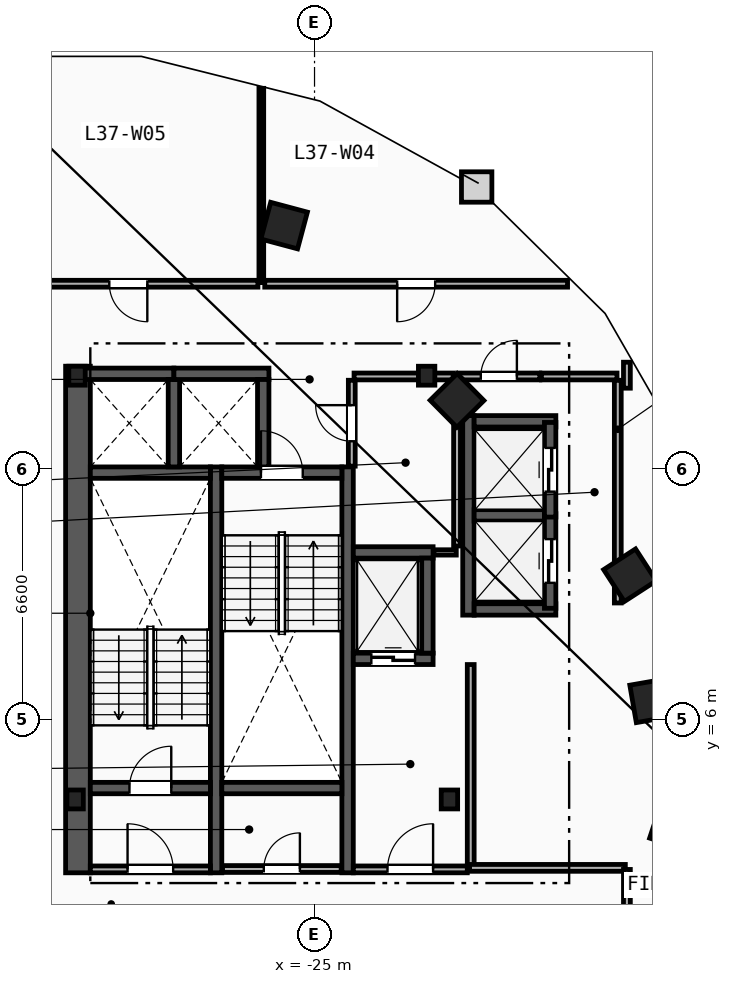
"""IFC4 building model, lengths in metres.
Left out: names, types, materials, properties, quantities, classifications, styles, units other than length and angle.
Written with IfcOpenShell. Run it as: python <this file> out.ifc"""

import sys

from ifc_helpers import new_model, si_unit, direction, frame, frame_2d, origin, origin_2d, place, context, subcontext, project, spatial, rectangle, i_section, extrude, element, fill, save


model = new_model("IFC4")
c1 = context("Model", 3, precision=1e-05, world=origin(), true_north=direction((0.0, 1.0)))
c2 = subcontext(c1, "Body", "Model", "MODEL_VIEW")
j1 = project(units=[si_unit("LENGTHUNIT", "METRE"), si_unit("PLANEANGLEUNIT", "RADIAN")], contexts=[c1])
p1 = place(None, origin())
s1 = spatial("IfcSite", under=j1, at=p1, CompositionType="ELEMENT")
p2 = place(p1, origin())
s2 = spatial("IfcBuilding", under=s1, at=p2, CompositionType="ELEMENT")
p3 = place(p2, frame((0.0, 0.0, 144.0)))
s3 = spatial("IfcBuildingStorey", under=s2, at=p3, CompositionType="ELEMENT", Elevation=144.0)
for number, where, z_axis, x_axis in (
    (1, (-31.3, 3.9, 0.0), (0.0, 0.0, 1.0), (1.0, 0.0, 0.0)),
    (2, (-21.45, 3.9, 0.0), (0.0, 0.0, 1.0), (1.0, 0.0, 0.0)),
    (3, (-22.05, 15.05, 0.0), (0.0, 0.0, 1.0), (1.0, 0.0, 0.0)),
    (4, (-31.25, 15.05, 0.0), (0.0, 0.0, 1.0), (1.0, 0.0, 0.0)),
):
    element("IfcColumn", number, at=place(p3, frame(where, z_axis=z_axis, x_axis=x_axis)), inside=s3, PredefinedType="COLUMN", context=c2, shape_type="SweptSolid", body=[
        extrude(i_section(OverallWidth=0.432, OverallDepth=0.498, WebThickness=0.056, FlangeThickness=0.089, FilletRadius=0.018, at=origin_2d()), origin(), (0.0, 0.0, 1.0), 3.6),
    ])
for number, where, z_axis, x_axis in (
    (5, (-15.55, 3.2, 0.0), (0.0, 0.0, 1.0), (0.315, 0.949, 0.0)),
    (6, (-16.125, 6.5, 0.0), (0.0, 0.0, 1.0), (-0.172, 0.985, 0.0)),
    (7, (-16.7, 9.8, 0.0), (0.0, 0.0, 1.0), (-0.544, 0.839, 0.0)),
    (8, (-21.25, 14.4, 0.0), (0.0, 0.0, 1.0), (-0.703, 0.711, 0.0)),
    (9, (-25.8, 19.0, 0.0), (0.0, 0.0, 1.0), (-0.966, 0.259, 0.0)),
):
    element("IfcColumn", number, at=place(p3, frame(where, z_axis=z_axis, x_axis=x_axis)), inside=s3, PredefinedType="COLUMN", context=c2, shape_type="SweptSolid", body=[
        extrude(rectangle(XDim=1.0, YDim=1.0, at=origin_2d()), origin(), (0.0, 0.0, 1.0), 3.6),
    ])
p4 = place(p3, frame((-31.225, 1.97, 0.0), z_axis=(0.0, 0.0, 1.0), x_axis=(0.0, 1.0, 0.0)))
e10 = element("IfcWall", 10, at=p4, inside=s3, PredefinedType="SHEAR", context=c2, shape_type="SweptSolid", body=[
    extrude(rectangle(XDim=13.33, YDim=0.65, at=frame_2d((6.665, 0.0))), origin(), (0.0, 0.0, 1.0), 3.36),
])
for number, where, z_axis, x_axis in (
    (11, (-27.59, 1.97, 0.0), (0.0, 0.0, 1.0), (0.0, 1.0, 0.0)),
    (12, (-24.13, 1.97, 0.0), (0.0, 0.0, 1.0), (0.0, 1.0, 0.0)),
):
    element("IfcWall", number, at=place(p3, frame(where, z_axis=z_axis, x_axis=x_axis)), inside=s3, PredefinedType="SHEAR", context=c2, shape_type="SweptSolid", body=[
        extrude(rectangle(XDim=10.68, YDim=0.3, at=frame_2d((5.34, 0.0))), origin(), (0.0, 0.0, 1.0), 3.36),
    ])
p5 = place(p3, frame((-30.9, 4.2, 0.0), z_axis=(0.0, 0.0, 1.0), x_axis=(1.0, 0.0, 0.0)))
e13 = element("IfcWall", 13, at=p5, inside=s3, PredefinedType="SHEAR", context=c2, shape_type="SweptSolid", body=[
    extrude(rectangle(XDim=3.16, YDim=0.3, at=frame_2d((1.58, 0.0))), origin(), (0.0, 0.0, 1.0), 3.36),
])
p6 = place(p5, frame((1.03, 0.0, 0.0)))
e14 = element("IfcOpeningElement", 14, at=p6, cuts=e13, PredefinedType="OPENING", context=c2, shape_type="SweptSolid", body=[
    extrude(rectangle(XDim=1.1, YDim=2.15, at=frame_2d((0.55, 1.075))), frame((0.0, 0.16, 0.0), z_axis=(0.0, -1.0, 0.0), x_axis=(1.0, 0.0, 0.0)), (0.0, 0.0, 1.0), 0.32),
])
p7 = place(p3, frame((-30.9, 12.5, 0.0), z_axis=(0.0, 0.0, 1.0), x_axis=(1.0, 0.0, 0.0)))
e15 = element("IfcWall", 15, at=p7, inside=s3, PredefinedType="SHEAR", context=c2, shape_type="SweptSolid", body=[
    extrude(rectangle(XDim=3.16, YDim=0.3, at=frame_2d((1.58, 0.0))), origin(), (0.0, 0.0, 1.0), 3.36),
])
p8 = place(p3, frame((-27.44, 12.5, 0.0), z_axis=(0.0, 0.0, 1.0), x_axis=(1.0, 0.0, 0.0)))
e16 = element("IfcWall", 16, at=p8, inside=s3, PredefinedType="SHEAR", context=c2, shape_type="SweptSolid", body=[
    extrude(rectangle(XDim=3.16, YDim=0.3, at=frame_2d((1.58, 0.0))), origin(), (0.0, 0.0, 1.0), 3.36),
])
p9 = place(p8, frame((1.03, 0.0, 0.0)))
e17 = element("IfcOpeningElement", 17, at=p9, cuts=e16, PredefinedType="OPENING", context=c2, shape_type="SweptSolid", body=[
    extrude(rectangle(XDim=1.1, YDim=2.15, at=frame_2d((0.55, 1.075))), frame((0.0, 0.16, 0.0), z_axis=(0.0, -1.0, 0.0), x_axis=(1.0, 0.0, 0.0)), (0.0, 0.0, 1.0), 0.32),
])
p10 = place(p3, frame((-27.44, 4.2, 0.0), z_axis=(0.0, 0.0, 1.0), x_axis=(1.0, 0.0, 0.0)))
e18 = element("IfcWall", 18, at=p10, inside=s3, PredefinedType="SHEAR", context=c2, shape_type="SweptSolid", body=[
    extrude(rectangle(XDim=3.16, YDim=0.3, at=frame_2d((1.58, 0.0))), origin(), (0.0, 0.0, 1.0), 3.36),
])
p11 = place(p3, frame((-20.89, 2.15, 0.0), z_axis=(0.0, 0.0, 1.0), x_axis=(0.0, 1.0, 0.0)))
e19 = element("IfcWall", 19, at=p11, inside=s3, PredefinedType="PARTITIONING", context=c2, shape_type="SweptSolid", body=[
    extrude(rectangle(XDim=5.3, YDim=0.18, at=frame_2d((2.65, 0.0))), origin(), (0.0, 0.0, 1.0), 3.36),
])
p12 = place(p3, frame((-23.98, 2.06, 0.0), z_axis=(0.0, 0.0, 1.0), x_axis=(1.0, 0.0, 0.0)))
e20 = element("IfcWall", 20, at=p12, inside=s3, PredefinedType="PARTITIONING", context=c2, shape_type="SweptSolid", body=[
    extrude(rectangle(XDim=3.0, YDim=0.18, at=frame_2d((1.5, 0.0))), origin(), (0.0, 0.0, 1.0), 3.36),
])
p13 = place(p12, frame((0.9, 0.0, 0.0)))
e21 = element("IfcOpeningElement", 21, at=p13, cuts=e20, PredefinedType="OPENING", context=c2, shape_type="SweptSolid", body=[
    extrude(rectangle(XDim=1.2, YDim=2.15, at=frame_2d((0.6, 1.075))), frame((0.0, 0.1, 0.0), z_axis=(0.0, -1.0, 0.0), x_axis=(1.0, 0.0, 0.0)), (0.0, 0.0, 1.0), 0.2),
])
p14 = place(p3, frame((-30.9, 2.06, 0.0), z_axis=(0.0, 0.0, 1.0), x_axis=(1.0, 0.0, 0.0)))
e22 = element("IfcWall", 22, at=p14, inside=s3, PredefinedType="PARTITIONING", context=c2, shape_type="SweptSolid", body=[
    extrude(rectangle(XDim=3.16, YDim=0.18, at=frame_2d((1.58, 0.0))), origin(), (0.0, 0.0, 1.0), 3.36),
])
p15 = place(p14, frame((0.98, 0.0, 0.0)))
e23 = element("IfcOpeningElement", 23, at=p15, cuts=e22, PredefinedType="OPENING", context=c2, shape_type="SweptSolid", body=[
    extrude(rectangle(XDim=1.2, YDim=2.15, at=frame_2d((0.6, 1.075))), frame((0.0, 0.1, 0.0), z_axis=(0.0, -1.0, 0.0), x_axis=(1.0, 0.0, 0.0)), (0.0, 0.0, 1.0), 0.2),
])
p16 = place(p3, frame((-23.98, 7.6, 0.0), z_axis=(0.0, 0.0, 1.0), x_axis=(1.0, 0.0, 0.0)))
e24 = element("IfcWall", 24, at=p16, inside=s3, PredefinedType="SHEAR", context=c2, shape_type="SweptSolid", body=[
    extrude(rectangle(XDim=2.1, YDim=0.3, at=frame_2d((1.05, 0.0))), origin(), (0.0, 0.0, 1.0), 3.36),
])
p17 = place(p16, frame((0.475, 0.0, 0.0)))
e25 = element("IfcOpeningElement", 25, at=p17, cuts=e24, PredefinedType="OPENING", context=c2, shape_type="SweptSolid", body=[
    extrude(rectangle(XDim=1.15, YDim=2.2, at=frame_2d((0.575, 1.1))), frame((0.0, 0.16, 0.0), z_axis=(0.0, -1.0, 0.0), x_axis=(1.0, 0.0, 0.0)), (0.0, 0.0, 1.0), 0.32),
])
p18 = place(p3, frame((-23.98, 10.4, 0.0), z_axis=(0.0, 0.0, 1.0), x_axis=(1.0, 0.0, 0.0)))
e26 = element("IfcWall", 26, at=p18, inside=s3, PredefinedType="SHEAR", context=c2, shape_type="SweptSolid", body=[
    extrude(rectangle(XDim=2.1, YDim=0.3, at=frame_2d((1.05, 0.0))), origin(), (0.0, 0.0, 1.0), 3.36),
])
for number, where, z_axis, x_axis in (
    (27, (-22.03, 7.75, 0.0), (0.0, 0.0, 1.0), (0.0, 1.0, 0.0)),
    (28, (-31.2, 15.1, 0.0), (0.0, 0.0, 1.0), (1.0, 0.0, 0.0)),
):
    element("IfcWall", number, at=place(p3, frame(where, z_axis=z_axis, x_axis=x_axis)), inside=s3, PredefinedType="SHEAR", context=c2, shape_type="SweptSolid", body=[
        extrude(rectangle(XDim=2.5, YDim=0.3, at=frame_2d((1.25, 0.0))), origin(), (0.0, 0.0, 1.0), 3.36),
    ])
p19 = place(p3, frame((-28.7, 12.65, 0.0), z_axis=(0.0, 0.0, 1.0), x_axis=(0.0, 1.0, 0.0)))
e29 = element("IfcWall", 29, at=p19, inside=s3, PredefinedType="SHEAR", context=c2, shape_type="SweptSolid", body=[
    extrude(rectangle(XDim=2.3, YDim=0.3, at=frame_2d((1.15, 0.0))), origin(), (0.0, 0.0, 1.0), 3.36),
])
p20 = place(p3, frame((-28.7, 15.1, 0.0), z_axis=(0.0, 0.0, 1.0), x_axis=(1.0, 0.0, 0.0)))
e30 = element("IfcWall", 30, at=p20, inside=s3, PredefinedType="SHEAR", context=c2, shape_type="SweptSolid", body=[
    extrude(rectangle(XDim=2.5, YDim=0.3, at=frame_2d((1.25, 0.0))), origin(), (0.0, 0.0, 1.0), 3.36),
])
p21 = place(p3, frame((-26.35, 12.65, 0.0), z_axis=(0.0, 0.0, 1.0), x_axis=(0.0, 1.0, 0.0)))
e31 = element("IfcWall", 31, at=p21, inside=s3, PredefinedType="SHEAR", context=c2, shape_type="SweptSolid", body=[
    extrude(rectangle(XDim=2.3, YDim=0.3, at=frame_2d((1.15, 0.0))), origin(), (0.0, 0.0, 1.0), 3.36),
])
p22 = place(p3, frame((-20.95, 8.75, 0.0), z_axis=(0.0, 0.0, 1.0), x_axis=(0.0, 1.0, 0.0)))
e32 = element("IfcWall", 32, at=p22, inside=s3, PredefinedType="SHEAR", context=c2, shape_type="SweptSolid", body=[
    extrude(rectangle(XDim=5.25, YDim=0.3, at=frame_2d((2.625, 0.0))), origin(), (0.0, 0.0, 1.0), 3.36),
])
for number, where, z_axis, x_axis in (
    (33, (-20.8, 8.9, 0.0), (0.0, 0.0, 1.0), (1.0, 0.0, 0.0)),
    (34, (-20.8, 13.85, 0.0), (0.0, 0.0, 1.0), (1.0, 0.0, 0.0)),
):
    element("IfcWall", number, at=place(p3, frame(where, z_axis=z_axis, x_axis=x_axis)), inside=s3, PredefinedType="SHEAR", context=c2, shape_type="SweptSolid", body=[
        extrude(rectangle(XDim=2.15, YDim=0.3, at=frame_2d((1.075, 0.0))), origin(), (0.0, 0.0, 1.0), 3.36),
    ])
p23 = place(p3, frame((-20.8, 11.375, 0.0), z_axis=(0.0, 0.0, 1.0), x_axis=(1.0, 0.0, 0.0)))
e35 = element("IfcWall", 35, at=p23, inside=s3, PredefinedType="SHEAR", context=c2, shape_type="SweptSolid", body=[
    extrude(rectangle(XDim=1.85, YDim=0.3, at=frame_2d((0.925, 0.0))), origin(), (0.0, 0.0, 1.0), 3.36),
])
p24 = place(p3, frame((-18.8, 8.93, 0.0), z_axis=(0.0, 0.0, 1.0), x_axis=(0.0, 1.0, 0.0)))
e36 = element("IfcWall", 36, at=p24, inside=s3, PredefinedType="SHEAR", context=c2, shape_type="SweptSolid", body=[
    extrude(rectangle(XDim=2.49, YDim=0.3, at=frame_2d((1.245, 0.0))), origin(), (0.0, 0.0, 1.0), 3.36),
])
p25 = place(p24, frame((0.67, 0.0, 0.0)))
e37 = element("IfcOpeningElement", 37, at=p25, cuts=e36, PredefinedType="OPENING", context=c2, shape_type="SweptSolid", body=[
    extrude(rectangle(XDim=1.15, YDim=2.2, at=frame_2d((0.575, 1.1))), frame((0.0, 0.16, 0.0), z_axis=(0.0, -1.0, 0.0), x_axis=(1.0, 0.0, 0.0)), (0.0, 0.0, 1.0), 0.32),
])
p26 = place(p3, frame((-18.8, 11.33, 0.0), z_axis=(0.0, 0.0, 1.0), x_axis=(0.0, 1.0, 0.0)))
e38 = element("IfcWall", 38, at=p26, inside=s3, PredefinedType="SHEAR", context=c2, shape_type="SweptSolid", body=[
    extrude(rectangle(XDim=2.49, YDim=0.3, at=frame_2d((1.245, 0.0))), origin(), (0.0, 0.0, 1.0), 3.36),
])
p27 = place(p26, frame((0.67, 0.0, 0.0)))
e39 = element("IfcOpeningElement", 39, at=p27, cuts=e38, PredefinedType="OPENING", context=c2, shape_type="SweptSolid", body=[
    extrude(rectangle(XDim=1.15, YDim=2.2, at=frame_2d((0.575, 1.1))), frame((0.0, 0.16, 0.0), z_axis=(0.0, -1.0, 0.0), x_axis=(1.0, 0.0, 0.0)), (0.0, 0.0, 1.0), 0.32),
])
p28 = place(p3, frame((-17.02, 9.07, 0.0), z_axis=(0.0, 0.0, 1.0), x_axis=(0.0, 1.0, 0.0)))
e40 = element("IfcWall", 40, at=p28, inside=s3, PredefinedType="PARTITIONING", context=c2, shape_type="SweptSolid", body=[
    extrude(rectangle(XDim=5.86, YDim=0.18, at=frame_2d((2.93, 0.0))), origin(), (0.0, 0.0, 1.0), 3.36),
])
p29 = place(p3, frame((-21.23, 15.03, 0.0), z_axis=(0.0, 0.0, 1.0), x_axis=(1.0, 0.0, 0.0)))
e41 = element("IfcWall", 41, at=p29, inside=s3, PredefinedType="PARTITIONING", context=c2, shape_type="SweptSolid", body=[
    extrude(rectangle(XDim=2.16, YDim=0.18, at=frame_2d((1.08, 0.0))), origin(), (0.0, 0.0, 1.0), 3.36),
])
p30 = place(p29, frame((0.605, 0.0, 0.0)))
e42 = element("IfcOpeningElement", 42, at=p30, cuts=e41, PredefinedType="OPENING", context=c2, shape_type="SweptSolid", body=[
    extrude(rectangle(XDim=0.95, YDim=2.1, at=frame_2d((0.475, 1.05))), frame((0.0, 0.1, 0.0), z_axis=(0.0, -1.0, 0.0), x_axis=(1.0, 0.0, 0.0)), (0.0, 0.0, 1.0), 0.2),
])
p31 = place(p3, frame((-19.03, 15.03, 0.0), z_axis=(0.0, 0.0, 1.0), x_axis=(1.0, 0.0, 0.0)))
e43 = element("IfcWall", 43, at=p31, inside=s3, PredefinedType="PARTITIONING", context=c2, shape_type="SweptSolid", body=[
    extrude(rectangle(XDim=1.99, YDim=0.18, at=frame_2d((0.995, 0.0))), origin(), (0.0, 0.0, 1.0), 3.36),
])
p32 = place(p3, frame((-21.86, 10.4, 0.0), z_axis=(0.0, 0.0, 1.0), x_axis=(1.0, 0.0, 0.0)))
e44 = element("IfcWall", 44, at=p32, inside=s3, PredefinedType="PARTITIONING", context=c2, shape_type="SweptSolid", body=[
    extrude(rectangle(XDim=0.59, YDim=0.14, at=frame_2d((0.295, 0.0))), origin(), (0.0, 0.0, 1.0), 3.36),
])
p33 = place(p3, frame((-21.25, 10.57, 0.0), z_axis=(0.0, 0.0, 1.0), x_axis=(0.0, 1.0, 0.0)))
e45 = element("IfcWall", 45, at=p33, inside=s3, PredefinedType="PARTITIONING", context=c2, shape_type="SweptSolid", body=[
    extrude(rectangle(XDim=4.36, YDim=0.18, at=frame_2d((2.18, 0.0))), origin(), (0.0, 0.0, 1.0), 3.36),
])
p34 = place(p3, frame((-23.96, 15.03, 0.0), z_axis=(0.0, 0.0, 1.0), x_axis=(1.0, 0.0, 0.0)))
e46 = element("IfcWall", 46, at=p34, inside=s3, PredefinedType="PARTITIONING", context=c2, shape_type="SweptSolid", body=[
    extrude(rectangle(XDim=2.61, YDim=0.18, at=frame_2d((1.305, 0.0))), origin(), (0.0, 0.0, 1.0), 2.433),
])
p35 = place(p3, frame((-27.42, 2.07, 0.0), z_axis=(0.0, 0.0, 1.0), x_axis=(1.0, 0.0, 0.0)))
e47 = element("IfcWall", 47, at=p35, inside=s3, PredefinedType="PARTITIONING", context=c2, shape_type="SweptSolid", body=[
    extrude(rectangle(XDim=3.12, YDim=0.18, at=frame_2d((1.56, 0.0))), origin(), (0.0, 0.0, 1.0), 3.36),
])
p36 = place(p35, frame((1.085, 0.0, 0.0)))
e48 = element("IfcOpeningElement", 48, at=p36, cuts=e47, PredefinedType="OPENING", context=c2, shape_type="SweptSolid", body=[
    extrude(rectangle(XDim=0.95, YDim=2.1, at=frame_2d((0.475, 1.05))), frame((0.0, 0.1, 0.0), z_axis=(0.0, -1.0, 0.0), x_axis=(1.0, 0.0, 0.0)), (0.0, 0.0, 1.0), 0.2),
])
p37 = place(p3, frame((-24.02, 12.67, 0.0), z_axis=(0.0, 0.0, 1.0), x_axis=(0.0, 1.0, 0.0)))
e49 = element("IfcWall", 49, at=p37, inside=s3, PredefinedType="PARTITIONING", context=c2, shape_type="SweptSolid", body=[
    extrude(rectangle(XDim=2.26, YDim=0.18, at=frame_2d((1.13, 0.0))), origin(), (0.0, 0.0, 1.0), 3.36),
])
p38 = place(p37, frame((0.655, 0.0, 0.0)))
e50 = element("IfcOpeningElement", 50, at=p38, cuts=e49, PredefinedType="OPENING", context=c2, shape_type="SweptSolid", body=[
    extrude(rectangle(XDim=0.95, YDim=2.1, at=frame_2d((0.475, 1.05))), frame((0.0, 0.1, 0.0), z_axis=(0.0, -1.0, 0.0), x_axis=(1.0, 0.0, 0.0)), (0.0, 0.0, 1.0), 0.2),
])
p39 = place(p3, frame((-26.4, 17.5, 0.0), z_axis=(0.0, 0.0, 1.0), x_axis=(0.0, 1.0, 0.0)))
e51 = element("IfcWall", 51, at=p39, inside=s3, PredefinedType="PARTITIONING", context=c2, shape_type="SweptSolid", body=[
    extrude(rectangle(XDim=5.111, YDim=0.125, at=frame_2d((2.556, 0.0))), origin(), (0.0, 0.0, 1.0), 3.36),
])
p40 = place(p3, frame((-16.822, 2.1, 0.0), z_axis=(0.0, 0.0, 1.0), x_axis=(-1.0, 0.0, 0.0)))
e52 = element("IfcWall", 52, at=p40, inside=s3, PredefinedType="PARTITIONING", context=c2, shape_type="SweptSolid", body=[
    extrude(rectangle(XDim=4.098, YDim=0.18, at=frame_2d((2.049, 0.0))), origin(), (0.0, 0.0, 1.0), 3.36),
])
p41 = place(p3, frame((-16.78, -0.329, 0.0), z_axis=(0.0, 0.0, 1.0), x_axis=(0.0, 1.0, 0.0)))
e53 = element("IfcWall", 53, at=p41, inside=s3, PredefinedType="PARTITIONING", context=c2, shape_type="SweptSolid", body=[
    extrude(rectangle(XDim=2.387, YDim=0.18, at=frame_2d((1.194, 0.0))), origin(), (0.0, 0.0, 1.0), 3.36),
])
p42 = place(p3, frame((-16.78, 14.721, 0.0), z_axis=(0.0, 0.0, 1.0), x_axis=(0.0, 1.0, 0.0)))
e54 = element("IfcWall", 54, at=p42, inside=s3, PredefinedType="PARTITIONING", context=c2, shape_type="SweptSolid", body=[
    extrude(rectangle(XDim=0.684, YDim=0.18, at=frame_2d((0.342, 0.0))), origin(), (0.0, 0.0, 1.0), 3.36),
])
p43 = place(p3, frame((-18.342, 17.47, 0.0), z_axis=(0.0, 0.0, 1.0), x_axis=(-1.0, 0.0, 0.0)))
e55 = element("IfcWall", 55, at=p43, inside=s3, PredefinedType="PARTITIONING", context=c2, shape_type="SweptSolid", body=[
    extrude(rectangle(XDim=7.968, YDim=0.18, at=frame_2d((3.984, 0.0))), origin(), (0.0, 0.0, 1.0), 3.36),
])
p44 = place(p43, frame((3.484, 0.0, 0.0)))
e56 = element("IfcOpeningElement", 56, at=p44, cuts=e55, PredefinedType="OPENING", context=c2, shape_type="SweptSolid", body=[
    extrude(rectangle(XDim=1.0, YDim=2.15, at=frame_2d((0.5, 1.075))), frame((0.0, 0.1, 0.0), z_axis=(0.0, -1.0, 0.0), x_axis=(1.0, 0.0, 0.0)), (0.0, 0.0, 1.0), 0.2),
])
p45 = place(p3, frame((-26.49, 17.47, 0.0), z_axis=(0.0, 0.0, 1.0), x_axis=(-1.0, 0.0, 0.0)))
e57 = element("IfcWall", 57, at=p45, inside=s3, PredefinedType="PARTITIONING", context=c2, shape_type="SweptSolid", body=[
    extrude(rectangle(XDim=6.82, YDim=0.18, at=frame_2d((3.41, 0.0))), origin(), (0.0, 0.0, 1.0), 3.36),
])
p46 = place(p45, frame((2.91, 0.0, 0.0)))
e58 = element("IfcOpeningElement", 58, at=p46, cuts=e57, PredefinedType="OPENING", context=c2, shape_type="SweptSolid", body=[
    extrude(rectangle(XDim=1.0, YDim=2.15, at=frame_2d((0.5, 1.075))), frame((0.0, 0.1, 0.0), z_axis=(0.0, -1.0, 0.0), x_axis=(1.0, 0.0, 0.0)), (0.0, 0.0, 1.0), 0.2),
])
p47 = place(p6, origin())
e59 = element("IfcDoor", 59, at=p47, inside=s3, OperationType="SINGLE_SWING_RIGHT", PredefinedType="DOOR", context=c2, shape_type="SweptSolid", body=[
    extrude(rectangle(XDim=1.1, YDim=2.15, at=frame_2d((0.55, 1.075))), frame((0.0, 0.025, 0.0), z_axis=(0.0, -1.0, 0.0), x_axis=(1.0, 0.0, 0.0)), (0.0, 0.0, 1.0), 0.05),
])
fill(e14, e59)
p48 = place(p9, origin())
e60 = element("IfcDoor", 60, at=p48, inside=s3, OperationType="SINGLE_SWING_LEFT", PredefinedType="DOOR", context=c2, shape_type="SweptSolid", body=[
    extrude(rectangle(XDim=1.1, YDim=2.15, at=frame_2d((0.55, 1.075))), frame((0.0, 0.025, 0.0), z_axis=(0.0, -1.0, 0.0), x_axis=(1.0, 0.0, 0.0)), (0.0, 0.0, 1.0), 0.05),
])
fill(e17, e60)
p49 = place(p13, origin())
e61 = element("IfcDoor", 61, at=p49, inside=s3, OperationType="SINGLE_SWING_RIGHT", PredefinedType="DOOR", context=c2, shape_type="SweptSolid", body=[
    extrude(rectangle(XDim=1.2, YDim=2.15, at=frame_2d((0.6, 1.075))), frame((0.0, 0.025, 0.0), z_axis=(0.0, -1.0, 0.0), x_axis=(1.0, 0.0, 0.0)), (0.0, 0.0, 1.0), 0.05),
])
fill(e21, e61)
p50 = place(p15, origin())
e62 = element("IfcDoor", 62, at=p50, inside=s3, OperationType="SINGLE_SWING_LEFT", PredefinedType="DOOR", context=c2, shape_type="SweptSolid", body=[
    extrude(rectangle(XDim=1.2, YDim=2.15, at=frame_2d((0.6, 1.075))), frame((0.0, 0.025, 0.0), z_axis=(0.0, -1.0, 0.0), x_axis=(1.0, 0.0, 0.0)), (0.0, 0.0, 1.0), 0.05),
])
fill(e23, e62)
p51 = place(p17, origin())
e63 = element("IfcDoor", 63, at=p51, inside=s3, OperationType="SLIDING_TO_LEFT", PredefinedType="TRAPDOOR", context=c2, shape_type="SweptSolid", body=[
    extrude(rectangle(XDim=1.15, YDim=2.2, at=frame_2d((0.575, 1.1))), frame((0.0, 0.025, 0.0), z_axis=(0.0, -1.0, 0.0), x_axis=(1.0, 0.0, 0.0)), (0.0, 0.0, 1.0), 0.05),
])
fill(e25, e63)
p52 = place(p25, origin())
e64 = element("IfcDoor", 64, at=p52, inside=s3, OperationType="SLIDING_TO_LEFT", PredefinedType="TRAPDOOR", context=c2, shape_type="SweptSolid", body=[
    extrude(rectangle(XDim=1.15, YDim=2.2, at=frame_2d((0.575, 1.1))), frame((0.0, 0.025, 0.0), z_axis=(0.0, -1.0, 0.0), x_axis=(1.0, 0.0, 0.0)), (0.0, 0.0, 1.0), 0.05),
])
fill(e37, e64)
p53 = place(p27, origin())
e65 = element("IfcDoor", 65, at=p53, inside=s3, OperationType="SLIDING_TO_LEFT", PredefinedType="TRAPDOOR", context=c2, shape_type="SweptSolid", body=[
    extrude(rectangle(XDim=1.15, YDim=2.2, at=frame_2d((0.575, 1.1))), frame((0.0, 0.025, 0.0), z_axis=(0.0, -1.0, 0.0), x_axis=(1.0, 0.0, 0.0)), (0.0, 0.0, 1.0), 0.05),
])
fill(e39, e65)
p54 = place(p44, origin())
e66 = element("IfcDoor", 66, at=p54, inside=s3, OperationType="SINGLE_SWING_RIGHT", PredefinedType="DOOR", context=c2, shape_type="SweptSolid", body=[
    extrude(rectangle(XDim=1.0, YDim=2.15, at=frame_2d((0.5, 1.075))), frame((0.0, 0.025, 0.0), z_axis=(0.0, -1.0, 0.0), x_axis=(1.0, 0.0, 0.0)), (0.0, 0.0, 1.0), 0.05),
])
fill(e56, e66)
p55 = place(p46, origin())
e67 = element("IfcDoor", 67, at=p55, inside=s3, OperationType="SINGLE_SWING_LEFT", PredefinedType="DOOR", context=c2, shape_type="SweptSolid", body=[
    extrude(rectangle(XDim=1.0, YDim=2.15, at=frame_2d((0.5, 1.075))), frame((0.0, 0.025, 0.0), z_axis=(0.0, -1.0, 0.0), x_axis=(1.0, 0.0, 0.0)), (0.0, 0.0, 1.0), 0.05),
])
fill(e58, e67)
p56 = place(p36, origin())
e68 = element("IfcDoor", 68, at=p56, inside=s3, OperationType="SINGLE_SWING_RIGHT", PredefinedType="DOOR", context=c2, shape_type="SweptSolid", body=[
    extrude(rectangle(XDim=0.95, YDim=2.1, at=frame_2d((0.475, 1.05))), frame((0.0, 0.025, 0.0), z_axis=(0.0, -1.0, 0.0), x_axis=(1.0, 0.0, 0.0)), (0.0, 0.0, 1.0), 0.05),
])
fill(e48, e68)
p57 = place(p38, origin())
e69 = element("IfcDoor", 69, at=p57, inside=s3, OperationType="SINGLE_SWING_RIGHT", PredefinedType="DOOR", context=c2, shape_type="SweptSolid", body=[
    extrude(rectangle(XDim=0.95, YDim=2.1, at=frame_2d((0.475, 1.05))), frame((0.0, 0.025, 0.0), z_axis=(0.0, -1.0, 0.0), x_axis=(1.0, 0.0, 0.0)), (0.0, 0.0, 1.0), 0.05),
])
fill(e50, e69)
p58 = place(p30, origin())
e70 = element("IfcDoor", 70, at=p58, inside=s3, OperationType="SINGLE_SWING_RIGHT", PredefinedType="DOOR", context=c2, shape_type="SweptSolid", body=[
    extrude(rectangle(XDim=0.95, YDim=2.1, at=frame_2d((0.475, 1.05))), frame((0.0, 0.025, 0.0), z_axis=(0.0, -1.0, 0.0), x_axis=(1.0, 0.0, 0.0)), (0.0, 0.0, 1.0), 0.05),
])
fill(e42, e70)
save(model, sys.argv[1])
